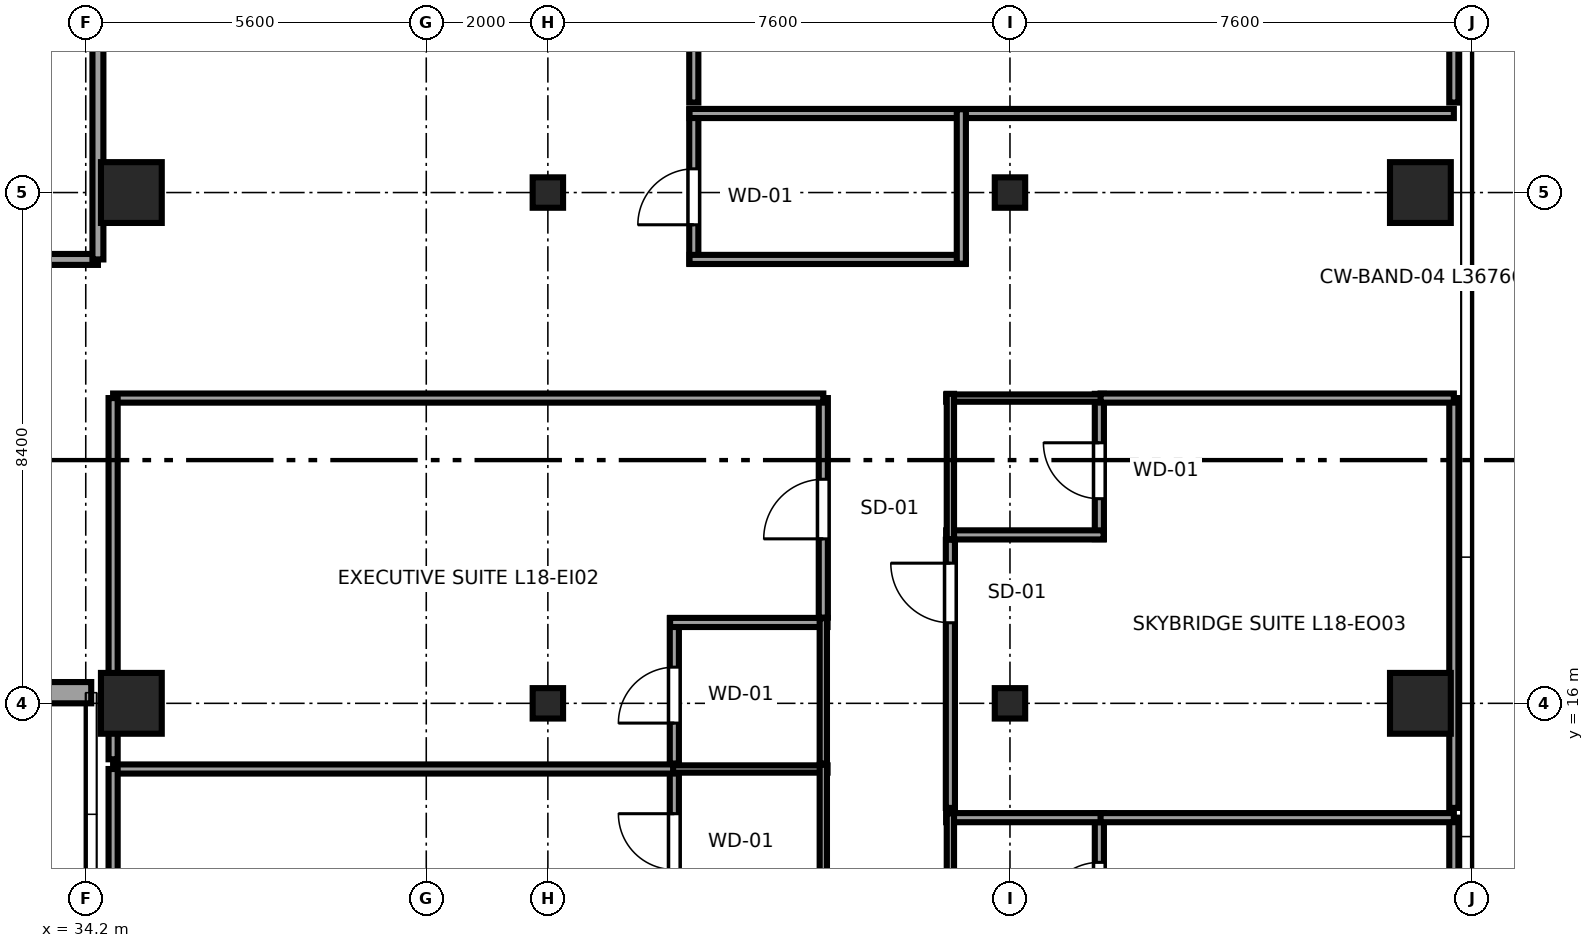
"""IFC4 building model, lengths in metres.
Left out: names, types, materials, properties, quantities, classifications, styles, units other than length and angle.
Written with IfcOpenShell. Run it as: python <this file> out.ifc"""

import sys

from ifc_helpers import new_model, si_unit, direction, frame, frame_2d, origin, origin_2d, place, context, subcontext, project, spatial, rectangle, i_section, extrude, source, transform, mapped, element, fill, save


model = new_model("IFC4")
c1 = context("Model", 3, precision=1e-05, world=origin(), true_north=direction((0.0, 1.0)))
c2 = subcontext(c1, "Body", "Model", "MODEL_VIEW")
j1 = project(units=[si_unit("LENGTHUNIT", "METRE"), si_unit("PLANEANGLEUNIT", "RADIAN")], contexts=[c1])
p1 = place(None, origin())
s1 = spatial("IfcSite", under=j1, at=p1, CompositionType="ELEMENT")
p2 = place(p1, origin())
s2 = spatial("IfcBuilding", under=s1, at=p2, CompositionType="ELEMENT")
p3 = place(p2, frame((0.0, 0.0, 74.6)))
s3 = spatial("IfcBuildingStorey", under=s2, at=p3, CompositionType="ELEMENT", Elevation=74.6)
m1 = source(origin(), c2, "Body", "SweptSolid", [
    extrude(rectangle(XDim=1.0, YDim=1.0, at=origin_2d()), origin(), (0.0, 0.0, 1.0), 3.55),
])
for number, where, z_axis, x_axis in (
    (1, (34.95, 16.0, 0.0), (0.0, 0.0, 1.0), (1.0, 0.0, 0.0)),
    (2, (34.95, 24.4, 0.0), (0.0, 0.0, 1.0), (1.0, 0.0, 0.0)),
):
    element("IfcColumn", number, at=place(p3, frame(where, z_axis=z_axis, x_axis=x_axis)), inside=s3, PredefinedType="COLUMN", context=c2, shape_type="MappedRepresentation", body=[
        mapped(m1, transform((0.0, 0.0, 0.0), x_axis=(1.0, 0.0, 0.0), y_axis=(0.0, 1.0, 0.0), z_axis=(0.0, 0.0, 1.0), scale=1.0)),
    ])
m2 = source(origin(), c2, "Body", "SweptSolid", [
    extrude(i_section(OverallWidth=0.5, OverallDepth=0.5, WebThickness=0.028, FlangeThickness=0.045, at=origin_2d()), origin(), (0.0, 0.0, 1.0), 3.55),
])
for number, where, z_axis, x_axis in (
    (3, (41.8, 16.0, 0.0), (0.0, 0.0, 1.0), (1.0, 0.0, 0.0)),
    (4, (41.8, 24.4, 0.0), (0.0, 0.0, 1.0), (1.0, 0.0, 0.0)),
    (5, (49.4, 16.0, 0.0), (0.0, 0.0, 1.0), (1.0, 0.0, 0.0)),
    (6, (49.4, 24.4, 0.0), (0.0, 0.0, 1.0), (1.0, 0.0, 0.0)),
):
    element("IfcColumn", number, at=place(p3, frame(where, z_axis=z_axis, x_axis=x_axis)), inside=s3, PredefinedType="COLUMN", context=c2, shape_type="MappedRepresentation", body=[
        mapped(m2, transform((0.0, 0.0, 0.0), x_axis=(1.0, 0.0, 0.0), y_axis=(0.0, 1.0, 0.0), z_axis=(0.0, 0.0, 1.0), scale=1.0)),
    ])
for number, where, z_axis, x_axis in (
    (7, (56.15, 16.0, 0.0), (0.0, 0.0, 1.0), (1.0, 0.0, 0.0)),
    (8, (56.15, 24.4, 0.0), (0.0, 0.0, 1.0), (1.0, 0.0, 0.0)),
):
    element("IfcColumn", number, at=place(p3, frame(where, z_axis=z_axis, x_axis=x_axis)), inside=s3, PredefinedType="COLUMN", context=c2, shape_type="MappedRepresentation", body=[
        mapped(m1, transform((0.0, 0.0, 0.0), x_axis=(1.0, 0.0, 0.0), y_axis=(0.0, 1.0, 0.0), z_axis=(0.0, 0.0, 1.0), scale=1.0)),
    ])
p4 = place(p3, frame((22.71, 16.175, 0.0), z_axis=(0.0, 0.0, 1.0), x_axis=(1.0, 0.0, 0.0)))
e9 = element("IfcWall", 9, at=p4, inside=s3, PredefinedType="SOLIDWALL", context=c2, shape_type="SweptSolid", body=[
    extrude(rectangle(XDim=11.58, YDim=0.35, at=frame_2d((5.79, 0.0))), origin(), (0.0, 0.0, 1.0), 2.748),
])
p5 = place(p4, frame((2.145, 0.0, 0.68)))
e10 = element("IfcOpeningElement", 10, at=p5, cuts=e9, PredefinedType="OPENING", context=c2, shape_type="SweptSolid", body=[
    extrude(rectangle(XDim=2.1, YDim=1.9, at=frame_2d((1.05, 0.95))), frame((0.0, 0.185, 0.0), z_axis=(0.0, -1.0, 0.0), x_axis=(1.0, 0.0, 0.0)), (0.0, 0.0, 1.0), 0.37),
])
p6 = place(p4, frame((7.335, 0.0, 0.68)))
e11 = element("IfcOpeningElement", 11, at=p6, cuts=e9, PredefinedType="OPENING", context=c2, shape_type="SweptSolid", body=[
    extrude(rectangle(XDim=2.1, YDim=1.9, at=frame_2d((1.05, 0.95))), frame((0.0, 0.185, 0.0), z_axis=(0.0, -1.0, 0.0), x_axis=(1.0, 0.0, 0.0)), (0.0, 0.0, 1.0), 0.37),
])
p7 = place(p3, frame((43.88, 12.6, 0.0), z_axis=(0.0, 0.0, 1.0), x_axis=(0.0, 1.0, 0.0)))
e12 = element("IfcWall", 12, at=p7, inside=s3, PredefinedType="PARTITIONING", context=c2, shape_type="SweptSolid", body=[
    extrude(rectangle(XDim=2.39, YDim=0.15, at=frame_2d((1.195, 0.0))), origin(), (0.0, 0.0, 1.0), 3.37),
])
p8 = place(p7, frame((0.665, 0.0, 0.0)))
e13 = element("IfcOpeningElement", 13, at=p8, cuts=e12, PredefinedType="OPENING", context=c2, shape_type="SweptSolid", body=[
    extrude(rectangle(XDim=0.92, YDim=2.01, at=frame_2d((0.46, 1.005))), frame((0.0, 0.085, 0.0), z_axis=(0.0, -1.0, 0.0), x_axis=(1.0, 0.0, 0.0)), (0.0, 0.0, 1.0), 0.17),
])
p9 = place(p3, frame((43.81, 14.92, 0.0), z_axis=(0.0, 0.0, 1.0), x_axis=(1.0, 0.0, 0.0)))
e14 = element("IfcWall", 14, at=p9, inside=s3, PredefinedType="PLUMBINGWALL", context=c2, shape_type="SweptSolid", body=[
    extrude(rectangle(XDim=2.59, YDim=0.12, at=frame_2d((1.295, 0.0))), origin(), (0.0, 0.0, 1.0), 3.37),
])
p10 = place(p3, frame((46.33, 12.6, 0.0), z_axis=(0.0, 0.0, 1.0), x_axis=(0.0, 1.0, 0.0)))
e15 = element("IfcWall", 15, at=p10, inside=s3, PredefinedType="PLUMBINGWALL", context=c2, shape_type="SweptSolid", body=[
    extrude(rectangle(XDim=2.39, YDim=0.12, at=frame_2d((1.195, 0.0))), origin(), (0.0, 0.0, 1.0), 3.37),
])
p11 = place(p3, frame((43.88, 15.01, 0.0), z_axis=(0.0, 0.0, 1.0), x_axis=(0.0, 1.0, 0.0)))
e16 = element("IfcWall", 16, at=p11, inside=s3, PredefinedType="PARTITIONING", context=c2, shape_type="SweptSolid", body=[
    extrude(rectangle(XDim=2.39, YDim=0.15, at=frame_2d((1.195, 0.0))), origin(), (0.0, 0.0, 1.0), 3.37),
])
p12 = place(p11, frame((0.665, 0.0, 0.0)))
e17 = element("IfcOpeningElement", 17, at=p12, cuts=e16, PredefinedType="OPENING", context=c2, shape_type="SweptSolid", body=[
    extrude(rectangle(XDim=0.92, YDim=2.01, at=frame_2d((0.46, 1.005))), frame((0.0, 0.085, 0.0), z_axis=(0.0, -1.0, 0.0), x_axis=(1.0, 0.0, 0.0)), (0.0, 0.0, 1.0), 0.17),
])
p13 = place(p3, frame((43.81, 17.33, 0.0), z_axis=(0.0, 0.0, 1.0), x_axis=(1.0, 0.0, 0.0)))
e18 = element("IfcWall", 18, at=p13, inside=s3, PredefinedType="PARTITIONING", context=c2, shape_type="SweptSolid", body=[
    extrude(rectangle(XDim=2.59, YDim=0.15, at=frame_2d((1.295, 0.0))), origin(), (0.0, 0.0, 1.0), 3.37),
])
p14 = place(p3, frame((46.33, 15.01, 0.0), z_axis=(0.0, 0.0, 1.0), x_axis=(0.0, 1.0, 0.0)))
e19 = element("IfcWall", 19, at=p14, inside=s3, PredefinedType="PLUMBINGWALL", context=c2, shape_type="SweptSolid", body=[
    extrude(rectangle(XDim=2.39, YDim=0.12, at=frame_2d((1.195, 0.0))), origin(), (0.0, 0.0, 1.0), 3.37),
])
p15 = place(p3, frame((50.87, 11.8, 0.0), z_axis=(0.0, 0.0, 1.0), x_axis=(0.0, 1.0, 0.0)))
e20 = element("IfcWall", 20, at=p15, inside=s3, PredefinedType="PARTITIONING", context=c2, shape_type="SweptSolid", body=[
    extrude(rectangle(XDim=2.39, YDim=0.15, at=frame_2d((1.195, 0.0))), origin(), (0.0, 0.0, 1.0), 3.37),
])
p16 = place(p15, frame((0.665, 0.0, 0.0)))
e21 = element("IfcOpeningElement", 21, at=p16, cuts=e20, PredefinedType="OPENING", context=c2, shape_type="SweptSolid", body=[
    extrude(rectangle(XDim=0.92, YDim=2.01, at=frame_2d((0.46, 1.005))), frame((0.0, 0.085, 0.0), z_axis=(0.0, -1.0, 0.0), x_axis=(1.0, 0.0, 0.0)), (0.0, 0.0, 1.0), 0.17),
])
p17 = place(p3, frame((48.35, 14.12, 0.0), z_axis=(0.0, 0.0, 1.0), x_axis=(1.0, 0.0, 0.0)))
e22 = element("IfcWall", 22, at=p17, inside=s3, PredefinedType="PARTITIONING", context=c2, shape_type="SweptSolid", body=[
    extrude(rectangle(XDim=2.59, YDim=0.15, at=frame_2d((1.295, 0.0))), origin(), (0.0, 0.0, 1.0), 3.37),
])
p18 = place(p3, frame((48.42, 11.8, 0.0), z_axis=(0.0, 0.0, 1.0), x_axis=(0.0, 1.0, 0.0)))
e23 = element("IfcWall", 23, at=p18, inside=s3, PredefinedType="PLUMBINGWALL", context=c2, shape_type="SweptSolid", body=[
    extrude(rectangle(XDim=2.39, YDim=0.12, at=frame_2d((1.195, 0.0))), origin(), (0.0, 0.0, 1.0), 3.37),
])
p19 = place(p3, frame((50.87, 18.7, 0.0), z_axis=(0.0, 0.0, 1.0), x_axis=(0.0, 1.0, 0.0)))
e24 = element("IfcWall", 24, at=p19, inside=s3, PredefinedType="PARTITIONING", context=c2, shape_type="SweptSolid", body=[
    extrude(rectangle(XDim=2.39, YDim=0.15, at=frame_2d((1.195, 0.0))), origin(), (0.0, 0.0, 1.0), 3.37),
])
p20 = place(p19, frame((0.665, 0.0, 0.0)))
e25 = element("IfcOpeningElement", 25, at=p20, cuts=e24, PredefinedType="OPENING", context=c2, shape_type="SweptSolid", body=[
    extrude(rectangle(XDim=0.92, YDim=2.01, at=frame_2d((0.46, 1.005))), frame((0.0, 0.085, 0.0), z_axis=(0.0, -1.0, 0.0), x_axis=(1.0, 0.0, 0.0)), (0.0, 0.0, 1.0), 0.17),
])
p21 = place(p3, frame((48.35, 18.77, 0.0), z_axis=(0.0, 0.0, 1.0), x_axis=(1.0, 0.0, 0.0)))
e26 = element("IfcWall", 26, at=p21, inside=s3, PredefinedType="PARTITIONING", context=c2, shape_type="SweptSolid", body=[
    extrude(rectangle(XDim=2.59, YDim=0.15, at=frame_2d((1.295, 0.0))), origin(), (0.0, 0.0, 1.0), 3.37),
])
p22 = place(p3, frame((48.35, 21.02, 0.0), z_axis=(0.0, 0.0, 1.0), x_axis=(1.0, 0.0, 0.0)))
e27 = element("IfcWall", 27, at=p22, inside=s3, PredefinedType="PLUMBINGWALL", context=c2, shape_type="SweptSolid", body=[
    extrude(rectangle(XDim=2.59, YDim=0.12, at=frame_2d((1.295, 0.0))), origin(), (0.0, 0.0, 1.0), 3.37),
])
p23 = place(p3, frame((48.42, 18.7, 0.0), z_axis=(0.0, 0.0, 1.0), x_axis=(0.0, 1.0, 0.0)))
e28 = element("IfcWall", 28, at=p23, inside=s3, PredefinedType="PLUMBINGWALL", context=c2, shape_type="SweptSolid", body=[
    extrude(rectangle(XDim=2.39, YDim=0.12, at=frame_2d((1.195, 0.0))), origin(), (0.0, 0.0, 1.0), 3.37),
])
p24 = place(p3, frame((34.65, 14.92, 0.0), z_axis=(0.0, 0.0, 1.0), x_axis=(1.0, 0.0, 0.0)))
e29 = element("IfcWall", 29, at=p24, inside=s3, PredefinedType="PARTITIONING", context=c2, shape_type="SweptSolid", body=[
    extrude(rectangle(XDim=9.21, YDim=0.15, at=frame_2d((4.605, 0.0))), origin(), (0.0, 0.0, 1.0), 3.37),
])
p25 = place(p3, frame((34.65, 8.23, 0.0), z_axis=(0.0, 0.0, 1.0), x_axis=(0.0, 1.0, 0.0)))
e30 = element("IfcWall", 30, at=p25, inside=s3, PredefinedType="PARTITIONING", context=c2, shape_type="SweptSolid", body=[
    extrude(rectangle(XDim=6.69, YDim=0.15, at=frame_2d((3.345, 0.0))), origin(), (0.0, 0.0, 1.0), 3.37),
])
p26 = place(p3, frame((46.33, 17.41, 0.0), z_axis=(0.0, 0.0, 1.0), x_axis=(0.0, 1.0, 0.0)))
e31 = element("IfcWall", 31, at=p26, inside=s3, PredefinedType="PARTITIONING", context=c2, shape_type="SweptSolid", body=[
    extrude(rectangle(XDim=3.61, YDim=0.15, at=frame_2d((1.805, 0.0))), origin(), (0.0, 0.0, 1.0), 3.37),
])
p27 = place(p26, frame((1.295, 0.0, 0.0)))
e32 = element("IfcOpeningElement", 32, at=p27, cuts=e31, PredefinedType="OPENING", context=c2, shape_type="SweptSolid", body=[
    extrude(rectangle(XDim=0.98, YDim=2.12, at=frame_2d((0.49, 1.06))), frame((0.0, 0.085, 0.0), z_axis=(0.0, -1.0, 0.0), x_axis=(1.0, 0.0, 0.0)), (0.0, 0.0, 1.0), 0.17),
])
p28 = place(p3, frame((34.65, 21.02, 0.0), z_axis=(0.0, 0.0, 1.0), x_axis=(1.0, 0.0, 0.0)))
e33 = element("IfcWall", 33, at=p28, inside=s3, PredefinedType="PARTITIONING", context=c2, shape_type="SweptSolid", body=[
    extrude(rectangle(XDim=11.68, YDim=0.15, at=frame_2d((5.84, 0.0))), origin(), (0.0, 0.0, 1.0), 3.37),
])
p29 = place(p3, frame((34.65, 15.08, 0.0), z_axis=(0.0, 0.0, 1.0), x_axis=(0.0, 1.0, 0.0)))
e34 = element("IfcWall", 34, at=p29, inside=s3, PredefinedType="PARTITIONING", context=c2, shape_type="SweptSolid", body=[
    extrude(rectangle(XDim=5.94, YDim=0.15, at=frame_2d((2.97, 0.0))), origin(), (0.0, 0.0, 1.0), 3.37),
])
p30 = place(p3, frame((56.7, 7.28, 0.0), z_axis=(0.0, 0.0, 1.0), x_axis=(0.0, 1.0, 0.0)))
e35 = element("IfcWall", 35, at=p30, inside=s3, PredefinedType="PARTITIONING", context=c2, shape_type="SweptSolid", body=[
    extrude(rectangle(XDim=6.84, YDim=0.15, at=frame_2d((3.42, 0.0))), origin(), (0.0, 0.0, 1.0), 3.37),
])
p31 = place(p3, frame((50.89, 14.12, 0.0), z_axis=(0.0, 0.0, 1.0), x_axis=(1.0, 0.0, 0.0)))
e36 = element("IfcWall", 36, at=p31, inside=s3, PredefinedType="PARTITIONING", context=c2, shape_type="SweptSolid", body=[
    extrude(rectangle(XDim=5.81, YDim=0.15, at=frame_2d((2.905, 0.0))), origin(), (0.0, 0.0, 1.0), 3.37),
])
p32 = place(p3, frame((48.42, 14.28, 0.0), z_axis=(0.0, 0.0, 1.0), x_axis=(0.0, 1.0, 0.0)))
e37 = element("IfcWall", 37, at=p32, inside=s3, PredefinedType="PARTITIONING", context=c2, shape_type="SweptSolid", body=[
    extrude(rectangle(XDim=4.41, YDim=0.15, at=frame_2d((2.205, 0.0))), origin(), (0.0, 0.0, 1.0), 3.37),
])
p33 = place(p32, frame((3.045, 0.0, 0.0)))
e38 = element("IfcOpeningElement", 38, at=p33, cuts=e37, PredefinedType="OPENING", context=c2, shape_type="SweptSolid", body=[
    extrude(rectangle(XDim=0.98, YDim=2.12, at=frame_2d((0.49, 1.06))), frame((0.0, 0.085, 0.0), z_axis=(0.0, -1.0, 0.0), x_axis=(1.0, 0.0, 0.0)), (0.0, 0.0, 1.0), 0.17),
])
p34 = place(p3, frame((56.7, 14.28, 0.0), z_axis=(0.0, 0.0, 1.0), x_axis=(0.0, 1.0, 0.0)))
e39 = element("IfcWall", 39, at=p34, inside=s3, PredefinedType="PARTITIONING", context=c2, shape_type="SweptSolid", body=[
    extrude(rectangle(XDim=6.74, YDim=0.15, at=frame_2d((3.37, 0.0))), origin(), (0.0, 0.0, 1.0), 3.37),
])
p35 = place(p3, frame((50.89, 21.02, 0.0), z_axis=(0.0, 0.0, 1.0), x_axis=(1.0, 0.0, 0.0)))
e40 = element("IfcWall", 40, at=p35, inside=s3, PredefinedType="PARTITIONING", context=c2, shape_type="SweptSolid", body=[
    extrude(rectangle(XDim=5.81, YDim=0.15, at=frame_2d((2.905, 0.0))), origin(), (0.0, 0.0, 1.0), 3.37),
])
p36 = place(p3, frame((44.2, 23.23, 0.0), z_axis=(0.0, 0.0, 1.0), x_axis=(0.0, 1.0, 0.0)))
e41 = element("IfcWall", 41, at=p36, inside=s3, PredefinedType="PARTITIONING", context=c2, shape_type="SweptSolid", body=[
    extrude(rectangle(XDim=2.54, YDim=0.15, at=frame_2d((1.27, 0.0))), origin(), (0.0, 0.0, 1.0), 3.37),
])
p37 = place(p36, frame((0.64, 0.0, 0.0)))
e42 = element("IfcOpeningElement", 42, at=p37, cuts=e41, PredefinedType="OPENING", context=c2, shape_type="SweptSolid", body=[
    extrude(rectangle(XDim=0.92, YDim=2.01, at=frame_2d((0.46, 1.005))), frame((0.0, 0.085, 0.0), z_axis=(0.0, -1.0, 0.0), x_axis=(1.0, 0.0, 0.0)), (0.0, 0.0, 1.0), 0.17),
])
p38 = place(p3, frame((44.13, 23.3, 0.0), z_axis=(0.0, 0.0, 1.0), x_axis=(1.0, 0.0, 0.0)))
e43 = element("IfcWall", 43, at=p38, inside=s3, PredefinedType="PARTITIONING", context=c2, shape_type="SweptSolid", body=[
    extrude(rectangle(XDim=4.54, YDim=0.15, at=frame_2d((2.27, 0.0))), origin(), (0.0, 0.0, 1.0), 3.37),
])
p39 = place(p3, frame((44.13, 25.7, 0.0), z_axis=(0.0, 0.0, 1.0), x_axis=(1.0, 0.0, 0.0)))
e44 = element("IfcWall", 44, at=p39, inside=s3, PredefinedType="PARTITIONING", context=c2, shape_type="SweptSolid", body=[
    extrude(rectangle(XDim=12.57, YDim=0.15, at=frame_2d((6.285, 0.0))), origin(), (0.0, 0.0, 1.0), 3.37),
])
p40 = place(p3, frame((48.6, 23.23, 0.0), z_axis=(0.0, 0.0, 1.0), x_axis=(0.0, 1.0, 0.0)))
e45 = element("IfcWall", 45, at=p40, inside=s3, PredefinedType="PARTITIONING", context=c2, shape_type="SweptSolid", body=[
    extrude(rectangle(XDim=2.54, YDim=0.15, at=frame_2d((1.27, 0.0))), origin(), (0.0, 0.0, 1.0), 3.37),
])
p41 = place(p3, frame((44.2, 25.88, 0.0), z_axis=(0.0, 0.0, 1.0), x_axis=(0.0, 1.0, 0.0)))
e46 = element("IfcWall", 46, at=p41, inside=s3, PredefinedType="PARTITIONING", context=c2, shape_type="SweptSolid", body=[
    extrude(rectangle(XDim=3.52, YDim=0.15, at=frame_2d((1.76, 0.0))), origin(), (0.0, 0.0, 1.0), 3.37),
])
p42 = place(p41, frame((0.935, 0.0, 0.0)))
e47 = element("IfcOpeningElement", 47, at=p42, cuts=e46, PredefinedType="OPENING", context=c2, shape_type="SweptSolid", body=[
    extrude(rectangle(XDim=1.65, YDim=2.15, at=frame_2d((0.825, 1.075))), frame((0.0, 0.085, 0.0), z_axis=(0.0, -1.0, 0.0), x_axis=(1.0, 0.0, 0.0)), (0.0, 0.0, 1.0), 0.17),
])
p43 = place(p3, frame((56.7, 25.88, 0.0), z_axis=(0.0, 0.0, 1.0), x_axis=(0.0, 1.0, 0.0)))
e48 = element("IfcWall", 48, at=p43, inside=s3, PredefinedType="PARTITIONING", context=c2, shape_type="SweptSolid", body=[
    extrude(rectangle(XDim=3.52, YDim=0.15, at=frame_2d((1.76, 0.0))), origin(), (0.0, 0.0, 1.0), 3.37),
])
p44 = place(p3, frame((27.1, 23.3, 0.0), z_axis=(0.0, 0.0, 1.0), x_axis=(1.0, 0.0, 0.0)))
e49 = element("IfcWall", 49, at=p44, inside=s3, PredefinedType="PARTITIONING", context=c2, shape_type="SweptSolid", body=[
    extrude(rectangle(XDim=7.3, YDim=0.18, at=frame_2d((3.65, 0.0))), origin(), (0.0, 0.0, 1.0), 3.37),
])
p45 = place(p44, frame((2.825, 0.0, 0.0)))
e50 = element("IfcOpeningElement", 50, at=p45, cuts=e49, PredefinedType="OPENING", context=c2, shape_type="SweptSolid", body=[
    extrude(rectangle(XDim=1.65, YDim=2.15, at=frame_2d((0.825, 1.075))), frame((0.0, 0.1, 0.0), z_axis=(0.0, -1.0, 0.0), x_axis=(1.0, 0.0, 0.0)), (0.0, 0.0, 1.0), 0.2),
])
p46 = place(p3, frame((34.4, 23.3, 0.0), z_axis=(0.0, 0.0, 1.0), x_axis=(0.0, 1.0, 0.0)))
e51 = element("IfcWall", 51, at=p46, inside=s3, PredefinedType="PARTITIONING", context=c2, shape_type="SweptSolid", body=[
    extrude(rectangle(XDim=6.5, YDim=0.18, at=frame_2d((3.25, 0.0))), origin(), (0.0, 0.0, 1.0), 3.37),
])
m3 = source(origin(), c2, "Body", "SweptSolid", [
    extrude(rectangle(XDim=0.92, YDim=2.01, at=frame_2d((0.46, 1.005))), frame((0.0, 0.025, 0.0), z_axis=(0.0, -1.0, 0.0), x_axis=(1.0, 0.0, 0.0)), (0.0, 0.0, 1.0), 0.05),
])
p47 = place(p8, origin())
e52 = element("IfcDoor", 52, at=p47, inside=s3, OperationType="SINGLE_SWING_RIGHT", PredefinedType="DOOR", context=c2, shape_type="MappedRepresentation", body=[
    mapped(m3, transform((0.0, 0.0, 0.0), x_axis=(1.0, 0.0, 0.0), y_axis=(0.0, 1.0, 0.0), z_axis=(0.0, 0.0, 1.0), scale=1.0)),
])
fill(e13, e52)
p48 = place(p12, origin())
e53 = element("IfcDoor", 53, at=p48, inside=s3, OperationType="SINGLE_SWING_LEFT", PredefinedType="DOOR", context=c2, shape_type="MappedRepresentation", body=[
    mapped(m3, transform((0.0, 0.0, 0.0), x_axis=(1.0, 0.0, 0.0), y_axis=(0.0, 1.0, 0.0), z_axis=(0.0, 0.0, 1.0), scale=1.0)),
])
fill(e17, e53)
p49 = place(p16, origin())
e54 = element("IfcDoor", 54, at=p49, inside=s3, OperationType="SINGLE_SWING_LEFT", PredefinedType="DOOR", context=c2, shape_type="MappedRepresentation", body=[
    mapped(m3, transform((0.0, 0.0, 0.0), x_axis=(1.0, 0.0, 0.0), y_axis=(0.0, 1.0, 0.0), z_axis=(0.0, 0.0, 1.0), scale=1.0)),
])
fill(e21, e54)
p50 = place(p20, origin())
e55 = element("IfcDoor", 55, at=p50, inside=s3, OperationType="SINGLE_SWING_RIGHT", PredefinedType="DOOR", context=c2, shape_type="MappedRepresentation", body=[
    mapped(m3, transform((0.0, 0.0, 0.0), x_axis=(1.0, 0.0, 0.0), y_axis=(0.0, 1.0, 0.0), z_axis=(0.0, 0.0, 1.0), scale=1.0)),
])
fill(e25, e55)
m4 = source(origin(), c2, "Body", "SweptSolid", [
    extrude(rectangle(XDim=0.98, YDim=2.12, at=frame_2d((0.49, 1.06))), frame((0.0, 0.025, 0.0), z_axis=(0.0, -1.0, 0.0), x_axis=(1.0, 0.0, 0.0)), (0.0, 0.0, 1.0), 0.05),
])
p51 = place(p27, origin())
e56 = element("IfcDoor", 56, at=p51, inside=s3, OperationType="SINGLE_SWING_LEFT", PredefinedType="DOOR", context=c2, shape_type="MappedRepresentation", body=[
    mapped(m4, transform((0.0, 0.0, 0.0), x_axis=(1.0, 0.0, 0.0), y_axis=(0.0, 1.0, 0.0), z_axis=(0.0, 0.0, 1.0), scale=1.0)),
])
fill(e32, e56)
p52 = place(p33, origin())
e57 = element("IfcDoor", 57, at=p52, inside=s3, OperationType="SINGLE_SWING_RIGHT", PredefinedType="DOOR", context=c2, shape_type="MappedRepresentation", body=[
    mapped(m4, transform((0.0, 0.0, 0.0), x_axis=(1.0, 0.0, 0.0), y_axis=(0.0, 1.0, 0.0), z_axis=(0.0, 0.0, 1.0), scale=1.0)),
])
fill(e38, e57)
p53 = place(p37, origin())
e58 = element("IfcDoor", 58, at=p53, inside=s3, OperationType="SINGLE_SWING_LEFT", PredefinedType="DOOR", context=c2, shape_type="MappedRepresentation", body=[
    mapped(m3, transform((0.0, 0.0, 0.0), x_axis=(1.0, 0.0, 0.0), y_axis=(0.0, 1.0, 0.0), z_axis=(0.0, 0.0, 1.0), scale=1.0)),
])
fill(e42, e58)
save(model, sys.argv[1])
